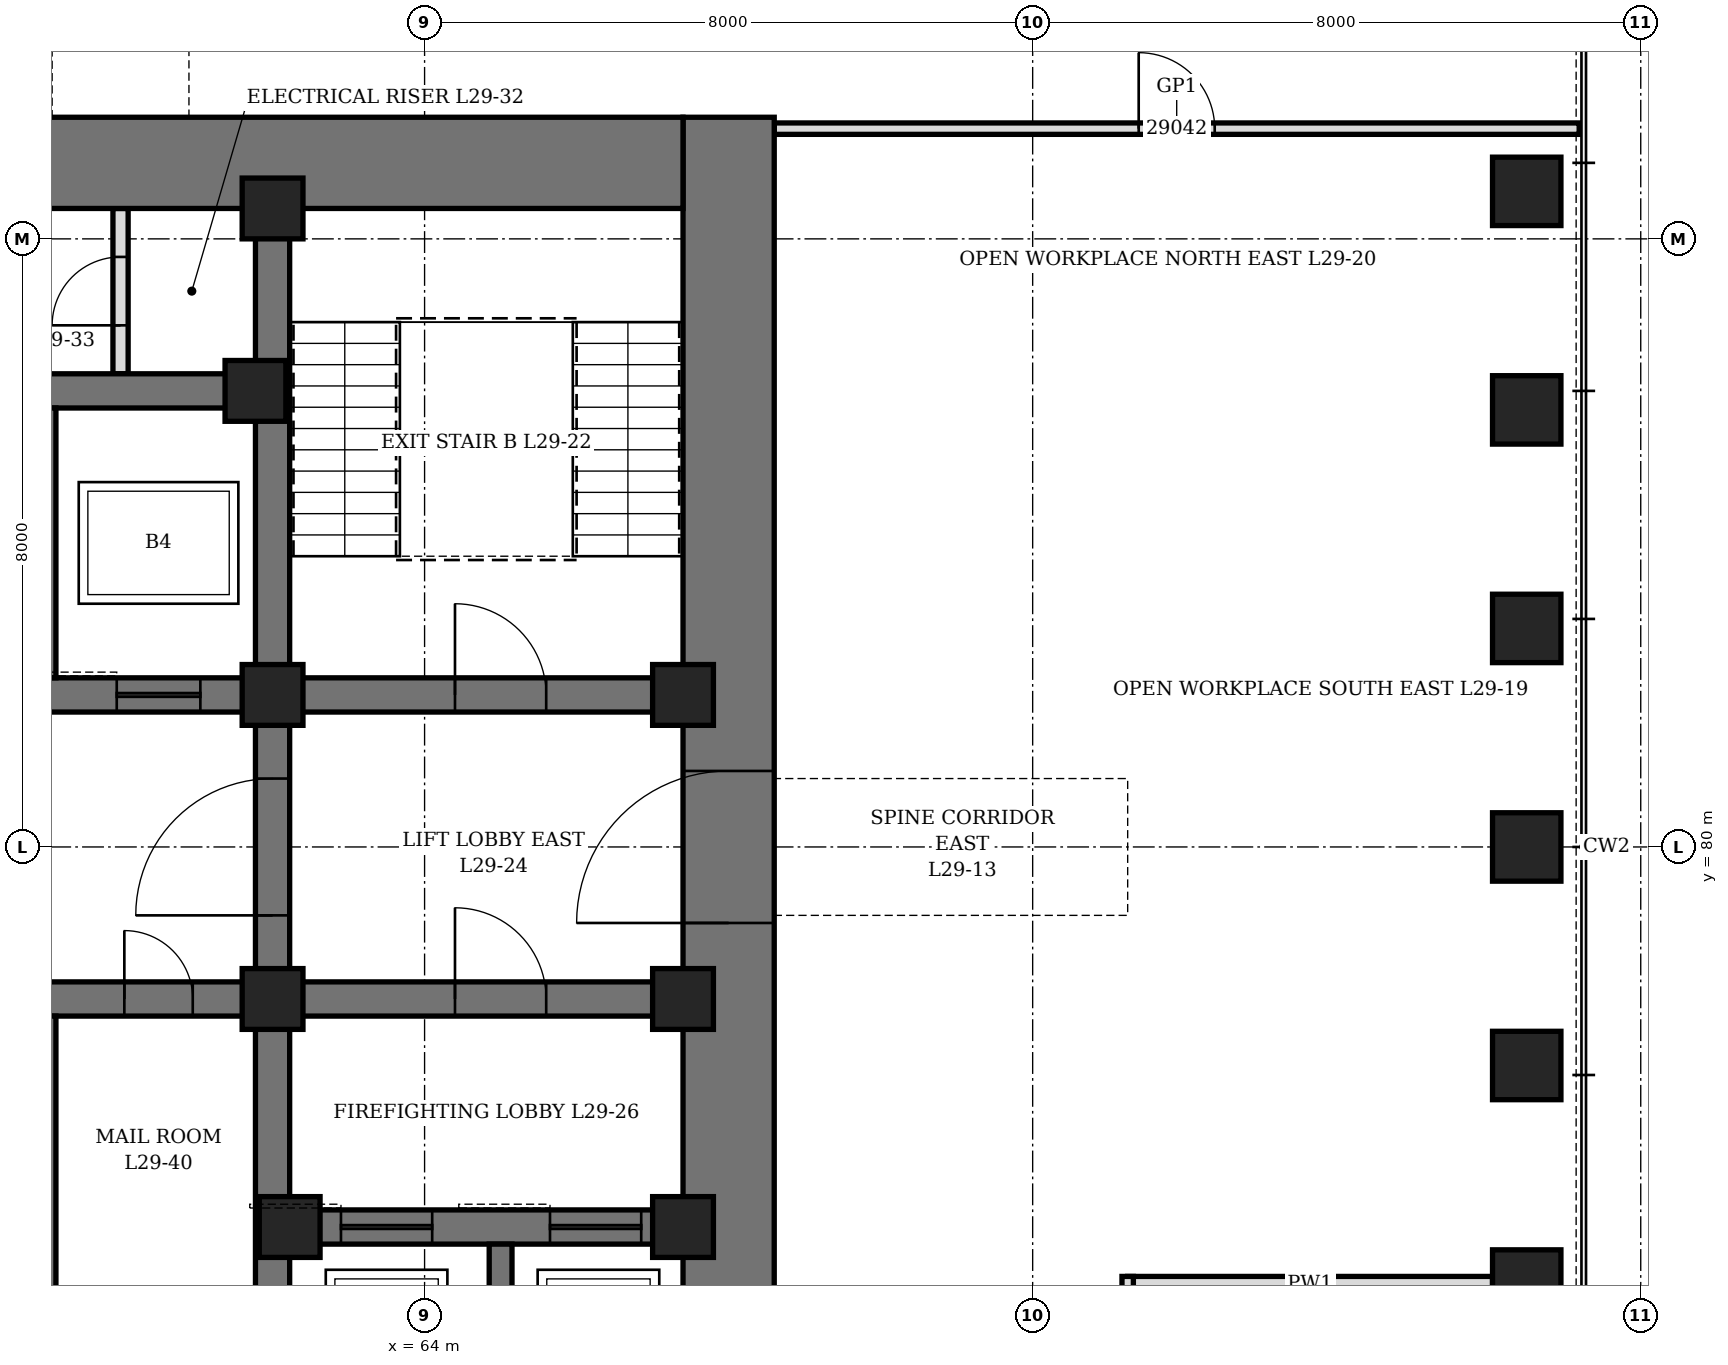
"""IFC4 building model, lengths in metres.
Left out: names, types, materials, properties, quantities, classifications, styles, units other than length and angle.
Written with IfcOpenShell. Run it as: python <this file> out.ifc"""

import sys

from ifc_helpers import new_model, si_unit, direction, frame, frame_2d, origin, origin_2d, place, context, subcontext, project, spatial, rectangle, hollow_rectangle, extrude, element, fill, save


model = new_model("IFC4")
c1 = context("Model", 3, precision=1e-05, world=origin(), true_north=direction((0.0, 1.0)))
c2 = subcontext(c1, "Body", "Model", "MODEL_VIEW")
j1 = project(units=[si_unit("LENGTHUNIT", "METRE"), si_unit("PLANEANGLEUNIT", "RADIAN")], contexts=[c1])
p1 = place(None, origin())
s1 = spatial("IfcSite", under=j1, at=p1, CompositionType="ELEMENT")
p2 = place(p1, origin())
s2 = spatial("IfcBuilding", under=s1, at=p2, CompositionType="ELEMENT")
p3 = place(p2, frame((0.0, 0.0, 133.3)))
s3 = spatial("IfcBuildingStorey", under=s2, at=p3, CompositionType="ELEMENT", Elevation=133.3)
for number, where, z_axis, x_axis in (
    (1, (78.5, 74.25, 0.0), (0.0, 0.0, 1.0), (0.0, 1.0, 0.0)),
    (2, (78.5, 77.125, 0.0), (0.0, 0.0, 1.0), (0.0, 1.0, 0.0)),
    (3, (78.5, 80.0, 0.0), (0.0, 0.0, 1.0), (0.0, 1.0, 0.0)),
    (4, (78.5, 82.875, 0.0), (0.0, 0.0, 1.0), (0.0, 1.0, 0.0)),
    (5, (78.5, 85.75, 0.0), (0.0, 0.0, 1.0), (0.0, 1.0, 0.0)),
    (6, (78.5, 88.625, 0.0), (0.0, 0.0, 1.0), (0.0, 1.0, 0.0)),
):
    element("IfcColumn", number, at=place(p3, frame(where, z_axis=z_axis, x_axis=x_axis)), inside=s3, PredefinedType="COLUMN", context=c2, shape_type="SweptSolid", body=[
        extrude(hollow_rectangle(XDim=0.9, YDim=0.9, WallThickness=0.15, at=origin_2d()), origin(), (0.0, 0.0, 1.0), 4.2),
    ])
p4 = place(p3, frame((68.0, 70.4, 0.0), z_axis=(0.0, 0.0, 1.0), x_axis=(0.0, 1.0, 0.0)))
e7 = element("IfcWall", 7, at=p4, inside=s3, PredefinedType="SHEAR", context=c2, shape_type="SweptSolid", body=[
    extrude(rectangle(XDim=19.2, YDim=1.2, at=frame_2d((9.6, 0.0))), origin(), (0.0, 0.0, 1.0), 4.2),
])
p5 = place(p4, frame((8.6, 0.0, 0.0)))
e8 = element("IfcOpeningElement", 8, at=p5, cuts=e7, PredefinedType="OPENING", context=c2, shape_type="SweptSolid", body=[
    extrude(rectangle(XDim=2.0, YDim=2.4, at=frame_2d((1.0, 1.2))), frame((0.0, 0.61, 0.0), z_axis=(0.0, -1.0, 0.0), x_axis=(1.0, 0.0, 0.0)), (0.0, 0.0, 1.0), 1.22),
])
p6 = place(p3, frame((44.6, 89.0, 0.0), z_axis=(0.0, 0.0, 1.0), x_axis=(1.0, 0.0, 0.0)))
e9 = element("IfcWall", 9, at=p6, inside=s3, PredefinedType="SHEAR", context=c2, shape_type="SweptSolid", body=[
    extrude(rectangle(XDim=22.8, YDim=1.2, at=frame_2d((11.4, 0.0))), origin(), (0.0, 0.0, 1.0), 4.2),
])
p7 = place(p6, frame((6.325, 0.0, 0.0)))
e10 = element("IfcOpeningElement", 10, at=p7, cuts=e9, PredefinedType="OPENING", context=c2, shape_type="SweptSolid", body=[
    extrude(rectangle(XDim=1.0, YDim=2.1, at=frame_2d((0.5, 1.05))), frame((0.0, 0.61, 0.0), z_axis=(0.0, -1.0, 0.0), x_axis=(1.0, 0.0, 0.0)), (0.0, 0.0, 1.0), 1.22),
])
p8 = place(p6, frame((9.25, 0.0, 0.0)))
e11 = element("IfcOpeningElement", 11, at=p8, cuts=e9, PredefinedType="OPENING", context=c2, shape_type="SweptSolid", body=[
    extrude(rectangle(XDim=0.9, YDim=2.1, at=frame_2d((0.45, 1.05))), frame((0.0, 0.61, 0.0), z_axis=(0.0, -1.0, 0.0), x_axis=(1.0, 0.0, 0.0)), (0.0, 0.0, 1.0), 1.22),
])
p9 = place(p6, frame((13.012, 0.0, 0.0)))
e12 = element("IfcOpeningElement", 12, at=p9, cuts=e9, PredefinedType="OPENING", context=c2, shape_type="SweptSolid", body=[
    extrude(rectangle(XDim=0.9, YDim=2.1, at=frame_2d((0.45, 1.05))), frame((0.0, 0.61, 0.0), z_axis=(0.0, -1.0, 0.0), x_axis=(1.0, 0.0, 0.0)), (0.0, 0.0, 1.0), 1.22),
])
p10 = place(p3, frame((62.0, 71.6, 0.0), z_axis=(0.0, 0.0, 1.0), x_axis=(0.0, 1.0, 0.0)))
e13 = element("IfcWall", 13, at=p10, inside=s3, PredefinedType="SHEAR", context=c2, shape_type="SweptSolid", body=[
    extrude(rectangle(XDim=16.8, YDim=0.45, at=frame_2d((8.4, 0.0))), origin(), (0.0, 0.0, 1.0), 4.2),
])
p11 = place(p10, frame((7.5, 0.0, 0.0)))
e14 = element("IfcOpeningElement", 14, at=p11, cuts=e13, PredefinedType="OPENING", context=c2, shape_type="SweptSolid", body=[
    extrude(rectangle(XDim=1.8, YDim=2.4, at=frame_2d((0.9, 1.2))), frame((0.0, 0.235, 0.0), z_axis=(0.0, -1.0, 0.0), x_axis=(1.0, 0.0, 0.0)), (0.0, 0.0, 1.0), 0.47),
])
p12 = place(p3, frame((62.225, 75.0, 0.0), z_axis=(0.0, 0.0, 1.0), x_axis=(1.0, 0.0, 0.0)))
e15 = element("IfcWall", 15, at=p12, inside=s3, PredefinedType="SHEAR", context=c2, shape_type="SweptSolid", body=[
    extrude(rectangle(XDim=5.175, YDim=0.45, at=frame_2d((2.587, 0.0))), origin(), (0.0, 0.0, 1.0), 4.2),
])
p13 = place(p12, frame((0.675, 0.0, 0.0)))
e16 = element("IfcOpeningElement", 16, at=p13, cuts=e15, PredefinedType="OPENING", context=c2, shape_type="SweptSolid", body=[
    extrude(rectangle(XDim=1.2, YDim=2.2, at=frame_2d((0.6, 1.1))), frame((0.0, 0.235, 0.0), z_axis=(0.0, -1.0, 0.0), x_axis=(1.0, 0.0, 0.0)), (0.0, 0.0, 1.0), 0.47),
])
p14 = place(p12, frame((3.425, 0.0, 0.0)))
e17 = element("IfcOpeningElement", 17, at=p14, cuts=e15, PredefinedType="OPENING", context=c2, shape_type="SweptSolid", body=[
    extrude(rectangle(XDim=1.2, YDim=2.2, at=frame_2d((0.6, 1.1))), frame((0.0, 0.235, 0.0), z_axis=(0.0, -1.0, 0.0), x_axis=(1.0, 0.0, 0.0)), (0.0, 0.0, 1.0), 0.47),
])
p15 = place(p3, frame((62.225, 78.0, 0.0), z_axis=(0.0, 0.0, 1.0), x_axis=(1.0, 0.0, 0.0)))
e18 = element("IfcWall", 18, at=p15, inside=s3, PredefinedType="SHEAR", context=c2, shape_type="SweptSolid", body=[
    extrude(rectangle(XDim=5.175, YDim=0.45, at=frame_2d((2.587, 0.0))), origin(), (0.0, 0.0, 1.0), 4.2),
])
p16 = place(p15, frame((2.175, 0.0, 0.0)))
e19 = element("IfcOpeningElement", 19, at=p16, cuts=e18, PredefinedType="OPENING", context=c2, shape_type="SweptSolid", body=[
    extrude(rectangle(XDim=1.2, YDim=2.1, at=frame_2d((0.6, 1.05))), frame((0.0, 0.235, 0.0), z_axis=(0.0, -1.0, 0.0), x_axis=(1.0, 0.0, 0.0)), (0.0, 0.0, 1.0), 0.47),
])
p17 = place(p3, frame((62.225, 82.0, 0.0), z_axis=(0.0, 0.0, 1.0), x_axis=(1.0, 0.0, 0.0)))
e20 = element("IfcWall", 20, at=p17, inside=s3, PredefinedType="SHEAR", context=c2, shape_type="SweptSolid", body=[
    extrude(rectangle(XDim=5.175, YDim=0.45, at=frame_2d((2.587, 0.0))), origin(), (0.0, 0.0, 1.0), 4.2),
])
p18 = place(p17, frame((2.175, 0.0, 0.0)))
e21 = element("IfcOpeningElement", 21, at=p18, cuts=e20, PredefinedType="OPENING", context=c2, shape_type="SweptSolid", body=[
    extrude(rectangle(XDim=1.2, YDim=2.1, at=frame_2d((0.6, 1.05))), frame((0.0, 0.235, 0.0), z_axis=(0.0, -1.0, 0.0), x_axis=(1.0, 0.0, 0.0)), (0.0, 0.0, 1.0), 0.47),
])
p19 = place(p3, frame((50.225, 78.0, 0.0), z_axis=(0.0, 0.0, 1.0), x_axis=(1.0, 0.0, 0.0)))
e22 = element("IfcWall", 22, at=p19, inside=s3, PredefinedType="SHEAR", context=c2, shape_type="SweptSolid", body=[
    extrude(rectangle(XDim=11.55, YDim=0.45, at=frame_2d((5.775, 0.0))), origin(), (0.0, 0.0, 1.0), 4.2),
])
p20 = place(p19, frame((0.825, 0.0, 0.0)))
e23 = element("IfcOpeningElement", 23, at=p20, cuts=e22, PredefinedType="OPENING", context=c2, shape_type="SweptSolid", body=[
    extrude(rectangle(XDim=0.9, YDim=2.1, at=frame_2d((0.45, 1.05))), frame((0.0, 0.235, 0.0), z_axis=(0.0, -1.0, 0.0), x_axis=(1.0, 0.0, 0.0)), (0.0, 0.0, 1.0), 0.47),
])
p21 = place(p19, frame((3.825, 0.0, 0.0)))
e24 = element("IfcOpeningElement", 24, at=p21, cuts=e22, PredefinedType="OPENING", context=c2, shape_type="SweptSolid", body=[
    extrude(rectangle(XDim=0.9, YDim=2.1, at=frame_2d((0.45, 1.05))), frame((0.0, 0.235, 0.0), z_axis=(0.0, -1.0, 0.0), x_axis=(1.0, 0.0, 0.0)), (0.0, 0.0, 1.0), 0.47),
])
p22 = place(p19, frame((6.825, 0.0, 0.0)))
e25 = element("IfcOpeningElement", 25, at=p22, cuts=e22, PredefinedType="OPENING", context=c2, shape_type="SweptSolid", body=[
    extrude(rectangle(XDim=0.9, YDim=2.1, at=frame_2d((0.45, 1.05))), frame((0.0, 0.235, 0.0), z_axis=(0.0, -1.0, 0.0), x_axis=(1.0, 0.0, 0.0)), (0.0, 0.0, 1.0), 0.47),
])
p23 = place(p19, frame((9.825, 0.0, 0.0)))
e26 = element("IfcOpeningElement", 26, at=p23, cuts=e22, PredefinedType="OPENING", context=c2, shape_type="SweptSolid", body=[
    extrude(rectangle(XDim=0.9, YDim=2.1, at=frame_2d((0.45, 1.05))), frame((0.0, 0.235, 0.0), z_axis=(0.0, -1.0, 0.0), x_axis=(1.0, 0.0, 0.0)), (0.0, 0.0, 1.0), 0.47),
])
p24 = place(p3, frame((50.225, 82.0, 0.0), z_axis=(0.0, 0.0, 1.0), x_axis=(1.0, 0.0, 0.0)))
e27 = element("IfcWall", 27, at=p24, inside=s3, PredefinedType="SHEAR", context=c2, shape_type="SweptSolid", body=[
    extrude(rectangle(XDim=11.55, YDim=0.45, at=frame_2d((5.775, 0.0))), origin(), (0.0, 0.0, 1.0), 4.2),
])
p25 = place(p24, frame((0.725, 0.0, 0.0)))
e28 = element("IfcOpeningElement", 28, at=p25, cuts=e27, PredefinedType="OPENING", context=c2, shape_type="SweptSolid", body=[
    extrude(rectangle(XDim=1.1, YDim=2.2, at=frame_2d((0.55, 1.1))), frame((0.0, 0.235, 0.0), z_axis=(0.0, -1.0, 0.0), x_axis=(1.0, 0.0, 0.0)), (0.0, 0.0, 1.0), 0.47),
])
p26 = place(p24, frame((3.725, 0.0, 0.0)))
e29 = element("IfcOpeningElement", 29, at=p26, cuts=e27, PredefinedType="OPENING", context=c2, shape_type="SweptSolid", body=[
    extrude(rectangle(XDim=1.1, YDim=2.2, at=frame_2d((0.55, 1.1))), frame((0.0, 0.235, 0.0), z_axis=(0.0, -1.0, 0.0), x_axis=(1.0, 0.0, 0.0)), (0.0, 0.0, 1.0), 0.47),
])
p27 = place(p24, frame((6.725, 0.0, 0.0)))
e30 = element("IfcOpeningElement", 30, at=p27, cuts=e27, PredefinedType="OPENING", context=c2, shape_type="SweptSolid", body=[
    extrude(rectangle(XDim=1.1, YDim=2.2, at=frame_2d((0.55, 1.1))), frame((0.0, 0.235, 0.0), z_axis=(0.0, -1.0, 0.0), x_axis=(1.0, 0.0, 0.0)), (0.0, 0.0, 1.0), 0.47),
])
p28 = place(p24, frame((9.725, 0.0, 0.0)))
e31 = element("IfcOpeningElement", 31, at=p28, cuts=e27, PredefinedType="OPENING", context=c2, shape_type="SweptSolid", body=[
    extrude(rectangle(XDim=1.1, YDim=2.2, at=frame_2d((0.55, 1.1))), frame((0.0, 0.235, 0.0), z_axis=(0.0, -1.0, 0.0), x_axis=(1.0, 0.0, 0.0)), (0.0, 0.0, 1.0), 0.47),
])
p29 = place(p3, frame((50.225, 86.0, 0.0), z_axis=(0.0, 0.0, 1.0), x_axis=(1.0, 0.0, 0.0)))
e32 = element("IfcWall", 32, at=p29, inside=s3, PredefinedType="SHEAR", context=c2, shape_type="SweptSolid", body=[
    extrude(rectangle(XDim=11.55, YDim=0.45, at=frame_2d((5.775, 0.0))), origin(), (0.0, 0.0, 1.0), 4.2),
])
p30 = place(p3, frame((59.0, 74.15, 0.0), z_axis=(0.0, 0.0, 1.0), x_axis=(0.0, 1.0, 0.0)))
e33 = element("IfcWall", 33, at=p30, inside=s3, PredefinedType="SHEAR", context=c2, shape_type="SweptSolid", body=[
    extrude(rectangle(XDim=3.625, YDim=0.3, at=frame_2d((1.812, 0.0))), origin(), (0.0, 0.0, 1.0), 4.2),
])
p31 = place(p3, frame((59.0, 82.225, 0.0), z_axis=(0.0, 0.0, 1.0), x_axis=(0.0, 1.0, 0.0)))
e34 = element("IfcWall", 34, at=p31, inside=s3, PredefinedType="SHEAR", context=c2, shape_type="SweptSolid", body=[
    extrude(rectangle(XDim=3.55, YDim=0.3, at=frame_2d((1.775, 0.0))), origin(), (0.0, 0.0, 1.0), 4.2),
])
p32 = place(p3, frame((65.0, 71.6, 0.0), z_axis=(0.0, 0.0, 1.0), x_axis=(0.0, 1.0, 0.0)))
e35 = element("IfcWall", 35, at=p32, inside=s3, PredefinedType="SHEAR", context=c2, shape_type="SweptSolid", body=[
    extrude(rectangle(XDim=3.175, YDim=0.3, at=frame_2d((1.587, 0.0))), origin(), (0.0, 0.0, 1.0), 4.2),
])
for number, where, z_axis, x_axis in (
    (36, (61.775, 86.0, 0.0), (0.0, 0.0, 1.0), (1.0, 0.0, 0.0)),
    (37, (62.0, 78.0, 0.0), (0.0, 0.0, 1.0), (1.0, 0.0, 0.0)),
    (38, (62.0, 82.0, 0.0), (0.0, 0.0, 1.0), (1.0, 0.0, 0.0)),
    (39, (62.0, 88.4, 0.0), (0.0, 0.0, 1.0), (1.0, 0.0, 0.0)),
    (40, (62.225, 75.0, 0.0), (0.0, 0.0, 1.0), (1.0, 0.0, 0.0)),
    (41, (67.4, 75.0, 0.0), (0.0, 0.0, 1.0), (1.0, 0.0, 0.0)),
    (42, (67.4, 78.0, 0.0), (0.0, 0.0, 1.0), (1.0, 0.0, 0.0)),
    (43, (67.4, 82.0, 0.0), (0.0, 0.0, 1.0), (1.0, 0.0, 0.0)),
):
    element("IfcColumn", number, at=place(p3, frame(where, z_axis=z_axis, x_axis=x_axis)), inside=s3, PredefinedType="COLUMN", context=c2, shape_type="SweptSolid", body=[
        extrude(hollow_rectangle(XDim=0.8, YDim=0.8, WallThickness=0.1, at=origin_2d()), origin(), (0.0, 0.0, 1.0), 4.2),
    ])
p33 = place(p3, frame((60.0, 86.225, 0.0), z_axis=(0.0, 0.0, 1.0), x_axis=(0.0, 1.0, 0.0)))
e44 = element("IfcWall", 44, at=p33, inside=s3, PredefinedType="PARTITIONING", context=c2, shape_type="SweptSolid", body=[
    extrude(rectangle(XDim=2.175, YDim=0.2, at=frame_2d((1.087, 0.0))), origin(), (0.0, 0.0, 1.0), 4.04),
])
p34 = place(p33, frame((0.637, 0.0, 0.0)))
e45 = element("IfcOpeningElement", 45, at=p34, cuts=e44, PredefinedType="OPENING", context=c2, shape_type="SweptSolid", body=[
    extrude(rectangle(XDim=0.9, YDim=2.1, at=frame_2d((0.45, 1.05))), frame((0.0, 0.11, 0.0), z_axis=(0.0, -1.0, 0.0), x_axis=(1.0, 0.0, 0.0)), (0.0, 0.0, 1.0), 0.22),
])
p35 = place(p3, frame((73.25, 74.25, 0.0), z_axis=(0.0, 0.0, 1.0), x_axis=(1.0, 0.0, 0.0)))
e46 = element("IfcWall", 46, at=p35, inside=s3, PredefinedType="PARTITIONING", context=c2, shape_type="SweptSolid", body=[
    extrude(rectangle(XDim=4.8, YDim=0.2, at=frame_2d((2.4, 0.0))), origin(), (0.0, 0.0, 1.0), 3.428),
])
p36 = place(p3, frame((68.6, 89.45, 0.0), z_axis=(0.0, 0.0, 1.0), x_axis=(1.0, 0.0, 0.0)))
e47 = element("IfcWall", 47, at=p36, inside=s3, PredefinedType="PARTITIONING", context=c2, shape_type="SweptSolid", body=[
    extrude(rectangle(XDim=10.59, YDim=0.15, at=frame_2d((5.295, 0.0))), origin(), (0.0, 0.0, 1.0), 4.04),
])
p37 = place(p36, frame((4.795, 0.0, 0.0)))
e48 = element("IfcOpeningElement", 48, at=p37, cuts=e47, PredefinedType="OPENING", context=c2, shape_type="SweptSolid", body=[
    extrude(rectangle(XDim=1.0, YDim=2.4, at=frame_2d((0.5, 1.2))), frame((0.0, 0.085, 0.0), z_axis=(0.0, -1.0, 0.0), x_axis=(1.0, 0.0, 0.0)), (0.0, 0.0, 1.0), 0.17),
])
p38 = place(p3, frame((73.25, 68.5, 0.0), z_axis=(0.0, 0.0, 1.0), x_axis=(0.0, 1.0, 0.0)))
e49 = element("IfcWall", 49, at=p38, inside=s3, PredefinedType="PARTITIONING", context=c2, shape_type="SweptSolid", body=[
    extrude(rectangle(XDim=5.85, YDim=0.15, at=frame_2d((2.925, 0.0))), origin(), (0.0, 0.0, 1.0), 4.04),
])
p39 = place(p38, frame((0.75, 0.0, 0.0)))
e50 = element("IfcOpeningElement", 50, at=p39, cuts=e49, PredefinedType="OPENING", context=c2, shape_type="SweptSolid", body=[
    extrude(rectangle(XDim=1.0, YDim=2.1, at=frame_2d((0.5, 1.05))), frame((0.0, 0.085, 0.0), z_axis=(0.0, -1.0, 0.0), x_axis=(1.0, 0.0, 0.0)), (0.0, 0.0, 1.0), 0.17),
])
p40 = place(p34, origin())
e51 = element("IfcDoor", 51, at=p40, inside=s3, OperationType="SINGLE_SWING_LEFT", PredefinedType="DOOR", context=c2, shape_type="SweptSolid", body=[
    extrude(rectangle(XDim=0.9, YDim=2.1, at=frame_2d((0.45, 1.05))), frame((0.0, 0.1, 0.0), z_axis=(0.0, -1.0, 0.0), x_axis=(1.0, 0.0, 0.0)), (0.0, 0.0, 1.0), 0.199),
])
fill(e45, e51)
p41 = place(p23, origin())
e52 = element("IfcDoor", 52, at=p41, inside=s3, OperationType="SINGLE_SWING_LEFT", PredefinedType="DOOR", context=c2, shape_type="SweptSolid", body=[
    extrude(rectangle(XDim=0.9, YDim=2.1, at=frame_2d((0.45, 1.05))), frame((0.0, 0.225, 0.0), z_axis=(0.0, -1.0, 0.0), x_axis=(1.0, 0.0, 0.0)), (0.0, 0.0, 1.0), 0.449),
])
fill(e26, e52)
p42 = place(p18, origin())
e53 = element("IfcDoor", 53, at=p42, inside=s3, OperationType="SINGLE_SWING_LEFT", PredefinedType="DOOR", context=c2, shape_type="SweptSolid", body=[
    extrude(rectangle(XDim=1.2, YDim=2.1, at=frame_2d((0.6, 1.05))), frame((0.0, 0.225, 0.0), z_axis=(0.0, -1.0, 0.0), x_axis=(1.0, 0.0, 0.0)), (0.0, 0.0, 1.0), 0.449),
])
fill(e21, e53)
p43 = place(p5, origin())
e54 = element("IfcDoor", 54, at=p43, inside=s3, OperationType="DOUBLE_DOOR_SINGLE_SWING", PredefinedType="DOOR", context=c2, shape_type="SweptSolid", body=[
    extrude(rectangle(XDim=2.0, YDim=2.4, at=frame_2d((1.0, 1.2))), frame((0.0, 0.35, 0.0), z_axis=(0.0, -1.0, 0.0), x_axis=(1.0, 0.0, 0.0)), (0.0, 0.0, 1.0), 0.7),
])
fill(e8, e54)
p44 = place(p11, origin())
e55 = element("IfcDoor", 55, at=p44, inside=s3, OperationType="DOUBLE_DOOR_SINGLE_SWING", PredefinedType="DOOR", context=c2, shape_type="SweptSolid", body=[
    extrude(rectangle(XDim=1.8, YDim=2.4, at=frame_2d((0.9, 1.2))), frame((0.0, 0.225, 0.0), z_axis=(0.0, -1.0, 0.0), x_axis=(1.0, 0.0, 0.0)), (0.0, 0.0, 1.0), 0.449),
])
fill(e14, e55)
p45 = place(p16, origin())
e56 = element("IfcDoor", 56, at=p45, inside=s3, OperationType="SINGLE_SWING_RIGHT", PredefinedType="DOOR", context=c2, shape_type="SweptSolid", body=[
    extrude(rectangle(XDim=1.2, YDim=2.1, at=frame_2d((0.6, 1.05))), frame((0.0, 0.225, 0.0), z_axis=(0.0, -1.0, 0.0), x_axis=(1.0, 0.0, 0.0)), (0.0, 0.0, 1.0), 0.449),
])
fill(e19, e56)
p46 = place(p28, origin())
e57 = element("IfcDoor", 57, at=p46, inside=s3, OperationType="SLIDING_TO_LEFT", PredefinedType="DOOR", context=c2, shape_type="SweptSolid", body=[
    extrude(rectangle(XDim=1.1, YDim=2.2, at=frame_2d((0.55, 1.1))), frame((0.0, 0.225, 0.0), z_axis=(0.0, -1.0, 0.0), x_axis=(1.0, 0.0, 0.0)), (0.0, 0.0, 1.0), 0.449),
])
fill(e31, e57)
p47 = place(p13, origin())
e58 = element("IfcDoor", 58, at=p47, inside=s3, OperationType="SLIDING_TO_LEFT", PredefinedType="DOOR", context=c2, shape_type="SweptSolid", body=[
    extrude(rectangle(XDim=1.2, YDim=2.2, at=frame_2d((0.6, 1.1))), frame((0.0, 0.225, 0.0), z_axis=(0.0, -1.0, 0.0), x_axis=(1.0, 0.0, 0.0)), (0.0, 0.0, 1.0), 0.449),
])
fill(e16, e58)
p48 = place(p14, origin())
e59 = element("IfcDoor", 59, at=p48, inside=s3, OperationType="SLIDING_TO_LEFT", PredefinedType="DOOR", context=c2, shape_type="SweptSolid", body=[
    extrude(rectangle(XDim=1.2, YDim=2.2, at=frame_2d((0.6, 1.1))), frame((0.0, 0.225, 0.0), z_axis=(0.0, -1.0, 0.0), x_axis=(1.0, 0.0, 0.0)), (0.0, 0.0, 1.0), 0.449),
])
fill(e17, e59)
p49 = place(p37, origin())
e60 = element("IfcDoor", 60, at=p49, inside=s3, OperationType="SINGLE_SWING_RIGHT", PredefinedType="DOOR", context=c2, shape_type="SweptSolid", body=[
    extrude(rectangle(XDim=1.0, YDim=2.4, at=frame_2d((0.5, 1.2))), frame((0.0, 0.075, 0.0), z_axis=(0.0, -1.0, 0.0), x_axis=(1.0, 0.0, 0.0)), (0.0, 0.0, 1.0), 0.149),
])
fill(e48, e60)
save(model, sys.argv[1])
